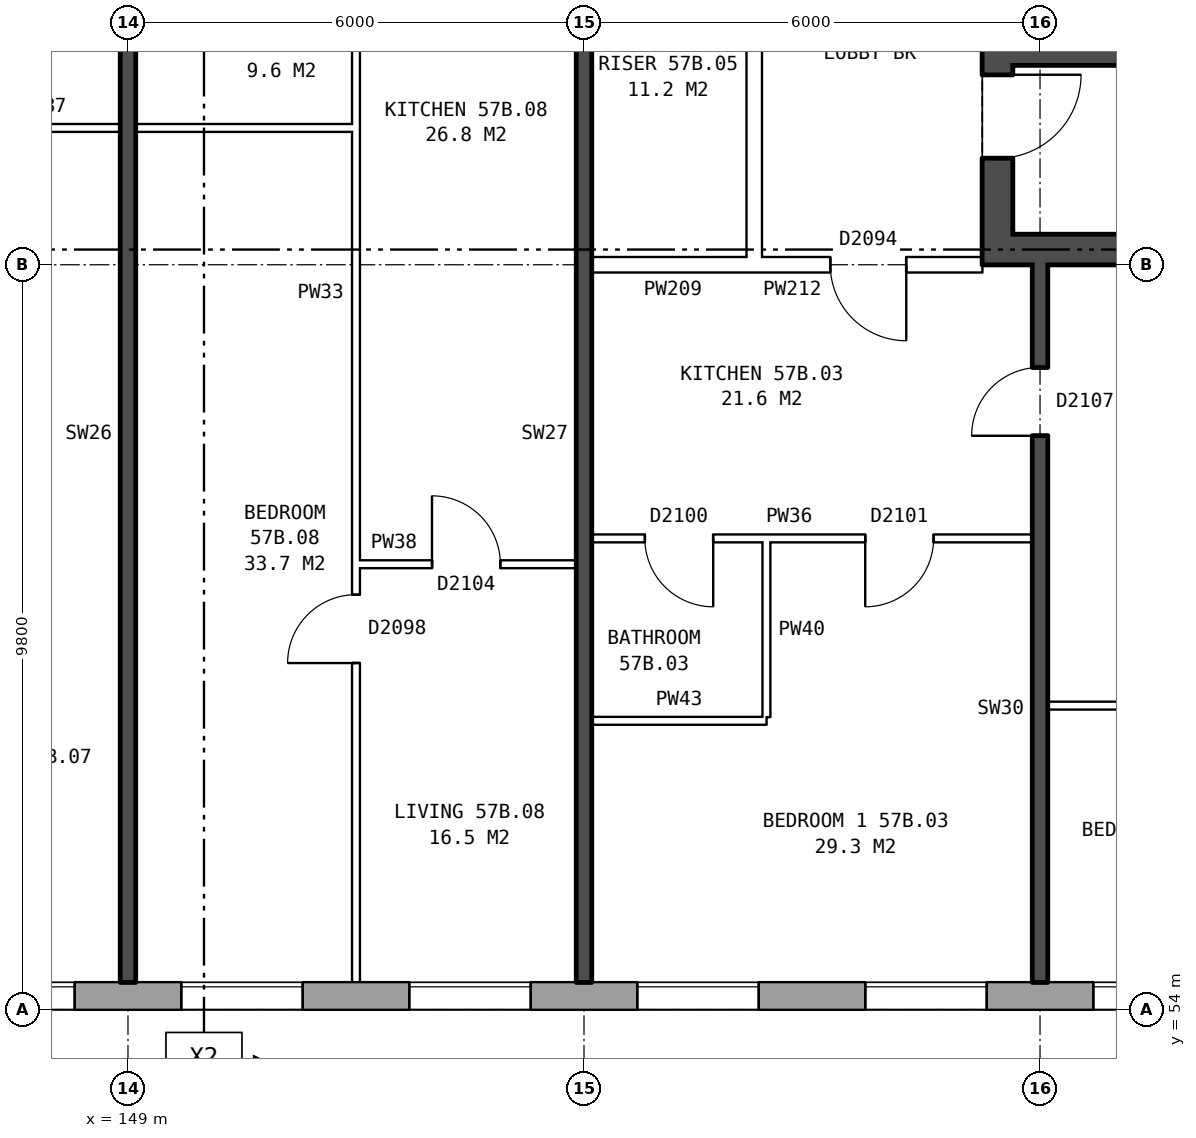
"""IFC4 building model, lengths in metres.
Left out: names, types, materials, properties, quantities, classifications, styles, units other than length and angle.
Written with IfcOpenShell. Run it as: python <this file> out.ifc"""

import sys

from ifc_helpers import new_model, si_unit, direction, frame, frame_2d, origin, place, context, subcontext, project, spatial, rectangle, extrude, element, fill, save


model = new_model("IFC4")
c1 = context("Model", 3, precision=1e-05, world=origin(), true_north=direction((0.0, 1.0)))
c2 = subcontext(c1, "Body", "Model", "MODEL_VIEW")
j1 = project(units=[si_unit("LENGTHUNIT", "METRE"), si_unit("PLANEANGLEUNIT", "RADIAN")], contexts=[c1])
p1 = place(None, origin())
s1 = spatial("IfcSite", under=j1, at=p1, CompositionType="ELEMENT")
p2 = place(p1, origin())
s2 = spatial("IfcBuilding", under=s1, at=p2, CompositionType="ELEMENT")
p3 = place(p2, frame((0.0, 0.0, 202.8)))
s3 = spatial("IfcBuildingStorey", under=s2, at=p3, CompositionType="ELEMENT", Elevation=202.8)
p4 = place(p3, frame((132.05, 54.18, 0.0), z_axis=(0.0, 0.0, 1.0), x_axis=(1.0, 0.0, 0.0)))
e1 = element("IfcWall", 1, at=p4, inside=s3, PredefinedType="STANDARD", context=c2, shape_type="SweptSolid", body=[
    extrude(rectangle(XDim=33.875, YDim=0.36, at=frame_2d((16.938, 0.0))), origin(), (0.0, 0.0, 1.0), 2.85),
])
p5 = place(p4, frame((2.65, 0.0, 0.8)))
e2 = element("IfcOpeningElement", 2, at=p5, cuts=e1, PredefinedType="OPENING", context=c2, shape_type="SweptSolid", body=[
    extrude(rectangle(XDim=1.6, YDim=1.8, at=frame_2d((0.8, 0.9))), frame((0.0, 0.19, 0.0), z_axis=(0.0, -1.0, 0.0), x_axis=(1.0, 0.0, 0.0)), (0.0, 0.0, 1.0), 0.38),
])
p6 = place(p4, frame((5.65, 0.0, 0.8)))
e3 = element("IfcOpeningElement", 3, at=p6, cuts=e1, PredefinedType="OPENING", context=c2, shape_type="SweptSolid", body=[
    extrude(rectangle(XDim=1.6, YDim=1.8, at=frame_2d((0.8, 0.9))), frame((0.0, 0.19, 0.0), z_axis=(0.0, -1.0, 0.0), x_axis=(1.0, 0.0, 0.0)), (0.0, 0.0, 1.0), 0.38),
])
p7 = place(p4, frame((8.65, 0.0, 0.8)))
e4 = element("IfcOpeningElement", 4, at=p7, cuts=e1, PredefinedType="OPENING", context=c2, shape_type="SweptSolid", body=[
    extrude(rectangle(XDim=1.6, YDim=1.8, at=frame_2d((0.8, 0.9))), frame((0.0, 0.19, 0.0), z_axis=(0.0, -1.0, 0.0), x_axis=(1.0, 0.0, 0.0)), (0.0, 0.0, 1.0), 0.38),
])
p8 = place(p4, frame((11.65, 0.0, 0.8)))
e5 = element("IfcOpeningElement", 5, at=p8, cuts=e1, PredefinedType="OPENING", context=c2, shape_type="SweptSolid", body=[
    extrude(rectangle(XDim=1.6, YDim=1.8, at=frame_2d((0.8, 0.9))), frame((0.0, 0.19, 0.0), z_axis=(0.0, -1.0, 0.0), x_axis=(1.0, 0.0, 0.0)), (0.0, 0.0, 1.0), 0.38),
])
p9 = place(p4, frame((14.65, 0.0, 0.8)))
e6 = element("IfcOpeningElement", 6, at=p9, cuts=e1, PredefinedType="OPENING", context=c2, shape_type="SweptSolid", body=[
    extrude(rectangle(XDim=1.6, YDim=1.8, at=frame_2d((0.8, 0.9))), frame((0.0, 0.19, 0.0), z_axis=(0.0, -1.0, 0.0), x_axis=(1.0, 0.0, 0.0)), (0.0, 0.0, 1.0), 0.38),
])
p10 = place(p4, frame((17.65, 0.0, 0.8)))
e7 = element("IfcOpeningElement", 7, at=p10, cuts=e1, PredefinedType="OPENING", context=c2, shape_type="SweptSolid", body=[
    extrude(rectangle(XDim=1.6, YDim=1.8, at=frame_2d((0.8, 0.9))), frame((0.0, 0.19, 0.0), z_axis=(0.0, -1.0, 0.0), x_axis=(1.0, 0.0, 0.0)), (0.0, 0.0, 1.0), 0.38),
])
p11 = place(p4, frame((20.65, 0.0, 0.8)))
e8 = element("IfcOpeningElement", 8, at=p11, cuts=e1, PredefinedType="OPENING", context=c2, shape_type="SweptSolid", body=[
    extrude(rectangle(XDim=1.6, YDim=1.8, at=frame_2d((0.8, 0.9))), frame((0.0, 0.19, 0.0), z_axis=(0.0, -1.0, 0.0), x_axis=(1.0, 0.0, 0.0)), (0.0, 0.0, 1.0), 0.38),
])
p12 = place(p4, frame((23.65, 0.0, 0.8)))
e9 = element("IfcOpeningElement", 9, at=p12, cuts=e1, PredefinedType="OPENING", context=c2, shape_type="SweptSolid", body=[
    extrude(rectangle(XDim=1.6, YDim=1.8, at=frame_2d((0.8, 0.9))), frame((0.0, 0.19, 0.0), z_axis=(0.0, -1.0, 0.0), x_axis=(1.0, 0.0, 0.0)), (0.0, 0.0, 1.0), 0.38),
])
p13 = place(p4, frame((26.65, 0.0, 0.8)))
e10 = element("IfcOpeningElement", 10, at=p13, cuts=e1, PredefinedType="OPENING", context=c2, shape_type="SweptSolid", body=[
    extrude(rectangle(XDim=1.6, YDim=1.8, at=frame_2d((0.8, 0.9))), frame((0.0, 0.19, 0.0), z_axis=(0.0, -1.0, 0.0), x_axis=(1.0, 0.0, 0.0)), (0.0, 0.0, 1.0), 0.38),
])
p14 = place(p4, frame((29.65, 0.0, 0.8)))
e11 = element("IfcOpeningElement", 11, at=p14, cuts=e1, PredefinedType="OPENING", context=c2, shape_type="SweptSolid", body=[
    extrude(rectangle(XDim=1.6, YDim=1.8, at=frame_2d((0.8, 0.9))), frame((0.0, 0.19, 0.0), z_axis=(0.0, -1.0, 0.0), x_axis=(1.0, 0.0, 0.0)), (0.0, 0.0, 1.0), 0.38),
])
p15 = place(p3, frame((160.44, 76.2, 0.0), z_axis=(0.0, 0.0, 1.0), x_axis=(0.0, -1.0, 0.0)))
e12 = element("IfcWall", 12, at=p15, inside=s3, PredefinedType="SHEAR", context=c2, shape_type="SweptSolid", body=[
    extrude(rectangle(XDim=12.4, YDim=0.4, at=frame_2d((6.2, 0.0))), origin(), (0.0, 0.0, 1.0), 2.85),
])
p16 = place(p15, frame((1.325, 0.0, 0.0)))
e13 = element("IfcOpeningElement", 13, at=p16, cuts=e12, PredefinedType="OPENING", context=c2, shape_type="SweptSolid", body=[
    extrude(rectangle(XDim=1.1, YDim=2.1, at=frame_2d((0.55, 1.05))), frame((0.0, 0.21, 0.0), z_axis=(0.0, -1.0, 0.0), x_axis=(1.0, 0.0, 0.0)), (0.0, 0.0, 1.0), 0.42),
])
p17 = place(p15, frame((4.825, 0.0, 0.0)))
e14 = element("IfcOpeningElement", 14, at=p17, cuts=e12, PredefinedType="OPENING", context=c2, shape_type="SweptSolid", body=[
    extrude(rectangle(XDim=0.85, YDim=2.1, at=frame_2d((0.425, 1.05))), frame((0.0, 0.21, 0.0), z_axis=(0.0, -1.0, 0.0), x_axis=(1.0, 0.0, 0.0)), (0.0, 0.0, 1.0), 0.42),
])
p18 = place(p15, frame((9.9, 0.0, 0.0)))
e15 = element("IfcOpeningElement", 15, at=p18, cuts=e12, PredefinedType="OPENING", context=c2, shape_type="SweptSolid", body=[
    extrude(rectangle(XDim=1.1, YDim=2.1, at=frame_2d((0.55, 1.05))), frame((0.0, 0.21, 0.0), z_axis=(0.0, -1.0, 0.0), x_axis=(1.0, 0.0, 0.0)), (0.0, 0.0, 1.0), 0.42),
])
p19 = place(p15, frame((8.125, 0.0, 0.0)))
e16 = element("IfcOpeningElement", 16, at=p19, cuts=e12, PredefinedType="OPENING", context=c2, shape_type="SweptSolid", body=[
    extrude(rectangle(XDim=0.85, YDim=2.1, at=frame_2d((0.425, 1.05))), frame((0.0, 0.21, 0.0), z_axis=(0.0, -1.0, 0.0), x_axis=(1.0, 0.0, 0.0)), (0.0, 0.0, 1.0), 0.42),
])
p20 = place(p3, frame((160.64, 64.0, 0.0), z_axis=(0.0, 0.0, 1.0), x_axis=(1.0, 0.0, 0.0)))
e17 = element("IfcWall", 17, at=p20, inside=s3, PredefinedType="SHEAR", context=c2, shape_type="SweptSolid", body=[
    extrude(rectangle(XDim=7.6, YDim=0.4, at=frame_2d((3.8, 0.0))), origin(), (0.0, 0.0, 1.0), 2.85),
])
p21 = place(p3, frame((160.64, 66.55, 0.0), z_axis=(0.0, 0.0, 1.0), x_axis=(1.0, 0.0, 0.0)))
e18 = element("IfcWall", 18, at=p21, inside=s3, PredefinedType="SHEAR", context=c2, shape_type="SweptSolid", body=[
    extrude(rectangle(XDim=2.525, YDim=0.25, at=frame_2d((1.263, 0.0))), origin(), (0.0, 0.0, 1.0), 2.85),
])
p22 = place(p3, frame((157.24, 63.9, 0.0), z_axis=(0.0, 0.0, 1.0), x_axis=(0.0, 1.0, 0.0)))
e19 = element("IfcWall", 19, at=p22, inside=s3, PredefinedType="PARTITIONING", context=c2, shape_type="SweptSolid", body=[
    extrude(rectangle(XDim=12.2, YDim=0.2, at=frame_2d((6.1, 0.0))), origin(), (0.0, 0.0, 1.0), 2.85),
])
p23 = place(p22, frame((5.1, 0.0, 0.0)))
e20 = element("IfcOpeningElement", 20, at=p23, cuts=e19, PredefinedType="OPENING", context=c2, shape_type="SweptSolid", body=[
    extrude(rectangle(XDim=2.0, YDim=2.1, at=frame_2d((1.0, 1.05))), frame((0.0, 0.11, 0.0), z_axis=(0.0, -1.0, 0.0), x_axis=(1.0, 0.0, 0.0)), (0.0, 0.0, 1.0), 0.22),
])
p24 = place(p3, frame((155.1, 57.8, 0.0), z_axis=(0.0, 0.0, 1.0), x_axis=(1.0, 0.0, 0.0)))
e21 = element("IfcWall", 21, at=p24, inside=s3, PredefinedType="PARTITIONING", context=c2, shape_type="SweptSolid", body=[
    extrude(rectangle(XDim=2.3, YDim=0.1, at=frame_2d((1.15, 0.0))), origin(), (0.0, 0.0, 1.0), 2.85),
])
p25 = place(p3, frame((161.1, 58.0, 0.0), z_axis=(0.0, 0.0, 1.0), x_axis=(1.0, 0.0, 0.0)))
e22 = element("IfcWall", 22, at=p25, inside=s3, PredefinedType="PARTITIONING", context=c2, shape_type="SweptSolid", body=[
    extrude(rectangle(XDim=7.54, YDim=0.1, at=frame_2d((3.77, 0.0))), origin(), (0.0, 0.0, 1.0), 2.85),
])
p26 = place(p25, frame((3.32, 0.0, 0.0)))
e23 = element("IfcOpeningElement", 23, at=p26, cuts=e22, PredefinedType="OPENING", context=c2, shape_type="SweptSolid", body=[
    extrude(rectangle(XDim=0.9, YDim=2.1, at=frame_2d((0.45, 1.05))), frame((0.0, 0.06, 0.0), z_axis=(0.0, -1.0, 0.0), x_axis=(1.0, 0.0, 0.0)), (0.0, 0.0, 1.0), 0.12),
])
p27 = place(p3, frame((152.0, 59.86, 0.0), z_axis=(0.0, 0.0, 1.0), x_axis=(1.0, 0.0, 0.0)))
e24 = element("IfcWall", 24, at=p27, inside=s3, PredefinedType="PARTITIONING", context=c2, shape_type="SweptSolid", body=[
    extrude(rectangle(XDim=2.9, YDim=0.1, at=frame_2d((1.45, 0.0))), origin(), (0.0, 0.0, 1.0), 2.85),
])
p28 = place(p27, frame((1.0, 0.0, 0.0)))
e25 = element("IfcOpeningElement", 25, at=p28, cuts=e24, PredefinedType="OPENING", context=c2, shape_type="SweptSolid", body=[
    extrude(rectangle(XDim=0.9, YDim=2.1, at=frame_2d((0.45, 1.05))), frame((0.0, 0.06, 0.0), z_axis=(0.0, -1.0, 0.0), x_axis=(1.0, 0.0, 0.0)), (0.0, 0.0, 1.0), 0.12),
])
p29 = place(p3, frame((155.1, 60.2, 0.0), z_axis=(0.0, 0.0, 1.0), x_axis=(1.0, 0.0, 0.0)))
e26 = element("IfcWall", 26, at=p29, inside=s3, PredefinedType="PARTITIONING", context=c2, shape_type="SweptSolid", body=[
    extrude(rectangle(XDim=5.8, YDim=0.1, at=frame_2d((2.9, 0.0))), origin(), (0.0, 0.0, 1.0), 2.85),
])
p30 = place(p29, frame((3.6, 0.0, 0.0)))
e27 = element("IfcOpeningElement", 27, at=p30, cuts=e26, PredefinedType="OPENING", context=c2, shape_type="SweptSolid", body=[
    extrude(rectangle(XDim=0.9, YDim=2.1, at=frame_2d((0.45, 1.05))), frame((0.0, 0.06, 0.0), z_axis=(0.0, -1.0, 0.0), x_axis=(1.0, 0.0, 0.0)), (0.0, 0.0, 1.0), 0.12),
])
p31 = place(p29, frame((0.7, 0.0, 0.0)))
e28 = element("IfcOpeningElement", 28, at=p31, cuts=e26, PredefinedType="OPENING", context=c2, shape_type="SweptSolid", body=[
    extrude(rectangle(XDim=0.9, YDim=2.1, at=frame_2d((0.45, 1.05))), frame((0.0, 0.06, 0.0), z_axis=(0.0, -1.0, 0.0), x_axis=(1.0, 0.0, 0.0)), (0.0, 0.0, 1.0), 0.12),
])
p32 = place(p3, frame((155.1, 63.8, 0.0), z_axis=(0.0, 0.0, 1.0), x_axis=(1.0, 0.0, 0.0)))
e29 = element("IfcWall", 29, at=p32, inside=s3, PredefinedType="PARTITIONING", context=c2, shape_type="SweptSolid", body=[
    extrude(rectangle(XDim=2.14, YDim=0.2, at=frame_2d((1.07, 0.0))), origin(), (0.0, 0.0, 1.0), 2.85),
])
p33 = place(p3, frame((157.24, 63.8, 0.0), z_axis=(0.0, 0.0, 1.0), x_axis=(1.0, 0.0, 0.0)))
e30 = element("IfcWall", 30, at=p33, inside=s3, PredefinedType="PARTITIONING", context=c2, shape_type="SweptSolid", body=[
    extrude(rectangle(XDim=3.0, YDim=0.2, at=frame_2d((1.5, 0.0))), origin(), (0.0, 0.0, 1.0), 2.85),
])
p34 = place(p33, frame((1.0, 0.0, 0.0)))
e31 = element("IfcOpeningElement", 31, at=p34, cuts=e30, PredefinedType="OPENING", context=c2, shape_type="SweptSolid", body=[
    extrude(rectangle(XDim=1.0, YDim=2.1, at=frame_2d((0.5, 1.05))), frame((0.0, 0.11, 0.0), z_axis=(0.0, -1.0, 0.0), x_axis=(1.0, 0.0, 0.0)), (0.0, 0.0, 1.0), 0.22),
])
p35 = place(p3, frame((146.0, 65.6, 0.0), z_axis=(0.0, 0.0, 1.0), x_axis=(1.0, 0.0, 0.0)))
e32 = element("IfcWall", 32, at=p35, inside=s3, PredefinedType="PARTITIONING", context=c2, shape_type="SweptSolid", body=[
    extrude(rectangle(XDim=6.0, YDim=0.1, at=frame_2d((3.0, 0.0))), origin(), (0.0, 0.0, 1.0), 2.85),
])
p36 = place(p3, frame((149.0, 54.36, 0.0), z_axis=(0.0, 0.0, 1.0), x_axis=(0.0, 1.0, 0.0)))
e33 = element("IfcWall", 33, at=p36, inside=s3, PredefinedType="SOLIDWALL", context=c2, shape_type="SweptSolid", body=[
    extrude(rectangle(XDim=14.44, YDim=0.2, at=frame_2d((7.22, 0.0))), origin(), (0.0, 0.0, 1.0), 2.85),
])
p37 = place(p3, frame((152.0, 54.36, 0.0), z_axis=(0.0, 0.0, 1.0), x_axis=(0.0, 1.0, 0.0)))
e34 = element("IfcWall", 34, at=p37, inside=s3, PredefinedType="PARTITIONING", context=c2, shape_type="SweptSolid", body=[
    extrude(rectangle(XDim=14.34, YDim=0.1, at=frame_2d((7.17, 0.0))), origin(), (0.0, 0.0, 1.0), 2.85),
])
p38 = place(p37, frame((4.2, 0.0, 0.0)))
e35 = element("IfcOpeningElement", 35, at=p38, cuts=e34, PredefinedType="OPENING", context=c2, shape_type="SweptSolid", body=[
    extrude(rectangle(XDim=0.9, YDim=2.1, at=frame_2d((0.45, 1.05))), frame((0.0, 0.06, 0.0), z_axis=(0.0, -1.0, 0.0), x_axis=(1.0, 0.0, 0.0)), (0.0, 0.0, 1.0), 0.12),
])
p39 = place(p37, frame((13.04, 0.0, 0.0)))
e36 = element("IfcOpeningElement", 36, at=p39, cuts=e34, PredefinedType="OPENING", context=c2, shape_type="SweptSolid", body=[
    extrude(rectangle(XDim=0.9, YDim=2.1, at=frame_2d((0.45, 1.05))), frame((0.0, 0.06, 0.0), z_axis=(0.0, -1.0, 0.0), x_axis=(1.0, 0.0, 0.0)), (0.0, 0.0, 1.0), 0.12),
])
p40 = place(p3, frame((155.0, 54.36, 0.0), z_axis=(0.0, 0.0, 1.0), x_axis=(0.0, 1.0, 0.0)))
e37 = element("IfcWall", 37, at=p40, inside=s3, PredefinedType="SOLIDWALL", context=c2, shape_type="SweptSolid", body=[
    extrude(rectangle(XDim=14.44, YDim=0.2, at=frame_2d((7.22, 0.0))), origin(), (0.0, 0.0, 1.0), 2.85),
])
p41 = place(p3, frame((157.4, 57.85, 0.0), z_axis=(0.0, 0.0, 1.0), x_axis=(0.0, 1.0, 0.0)))
e38 = element("IfcWall", 38, at=p41, inside=s3, PredefinedType="PARTITIONING", context=c2, shape_type="SweptSolid", body=[
    extrude(rectangle(XDim=2.3, YDim=0.1, at=frame_2d((1.15, 0.0))), origin(), (0.0, 0.0, 1.0), 2.85),
])
p42 = place(p3, frame((161.0, 54.36, 0.0), z_axis=(0.0, 0.0, 1.0), x_axis=(0.0, 1.0, 0.0)))
e39 = element("IfcWall", 39, at=p42, inside=s3, PredefinedType="SOLIDWALL", context=c2, shape_type="SweptSolid", body=[
    extrude(rectangle(XDim=9.44, YDim=0.2, at=frame_2d((4.72, 0.0))), origin(), (0.0, 0.0, 1.0), 2.85),
])
p43 = place(p42, frame((7.19, 0.0, 0.0)))
e40 = element("IfcOpeningElement", 40, at=p43, cuts=e39, PredefinedType="OPENING", context=c2, shape_type="SweptSolid", body=[
    extrude(rectangle(XDim=0.9, YDim=2.1, at=frame_2d((0.45, 1.05))), frame((0.0, 0.11, 0.0), z_axis=(0.0, -1.0, 0.0), x_axis=(1.0, 0.0, 0.0)), (0.0, 0.0, 1.0), 0.22),
])
p44 = place(p9, origin())
e41 = element("IfcWindow", 41, at=p44, inside=s3, PartitioningType="SINGLE_PANEL", PredefinedType="WINDOW", context=c2, shape_type="SweptSolid", body=[
    extrude(rectangle(XDim=1.6, YDim=1.8, at=frame_2d((0.8, 0.9))), frame((0.0, 0.15, 0.0), z_axis=(0.0, -1.0, 0.0), x_axis=(1.0, 0.0, 0.0)), (0.0, 0.0, 1.0), 0.06),
])
fill(e6, e41)
p45 = place(p10, origin())
e42 = element("IfcWindow", 42, at=p45, inside=s3, PartitioningType="SINGLE_PANEL", PredefinedType="WINDOW", context=c2, shape_type="SweptSolid", body=[
    extrude(rectangle(XDim=1.6, YDim=1.8, at=frame_2d((0.8, 0.9))), frame((0.0, 0.15, 0.0), z_axis=(0.0, -1.0, 0.0), x_axis=(1.0, 0.0, 0.0)), (0.0, 0.0, 1.0), 0.06),
])
fill(e7, e42)
p46 = place(p11, origin())
e43 = element("IfcWindow", 43, at=p46, inside=s3, PartitioningType="SINGLE_PANEL", PredefinedType="WINDOW", context=c2, shape_type="SweptSolid", body=[
    extrude(rectangle(XDim=1.6, YDim=1.8, at=frame_2d((0.8, 0.9))), frame((0.0, 0.15, 0.0), z_axis=(0.0, -1.0, 0.0), x_axis=(1.0, 0.0, 0.0)), (0.0, 0.0, 1.0), 0.06),
])
fill(e8, e43)
p47 = place(p12, origin())
e44 = element("IfcWindow", 44, at=p47, inside=s3, PartitioningType="SINGLE_PANEL", PredefinedType="WINDOW", context=c2, shape_type="SweptSolid", body=[
    extrude(rectangle(XDim=1.6, YDim=1.8, at=frame_2d((0.8, 0.9))), frame((0.0, 0.15, 0.0), z_axis=(0.0, -1.0, 0.0), x_axis=(1.0, 0.0, 0.0)), (0.0, 0.0, 1.0), 0.06),
])
fill(e9, e44)
p48 = place(p13, origin())
e45 = element("IfcWindow", 45, at=p48, inside=s3, PartitioningType="SINGLE_PANEL", PredefinedType="WINDOW", context=c2, shape_type="SweptSolid", body=[
    extrude(rectangle(XDim=1.6, YDim=1.8, at=frame_2d((0.8, 0.9))), frame((0.0, 0.15, 0.0), z_axis=(0.0, -1.0, 0.0), x_axis=(1.0, 0.0, 0.0)), (0.0, 0.0, 1.0), 0.06),
])
fill(e10, e45)
p49 = place(p14, origin())
e46 = element("IfcWindow", 46, at=p49, inside=s3, PartitioningType="SINGLE_PANEL", PredefinedType="WINDOW", context=c2, shape_type="SweptSolid", body=[
    extrude(rectangle(XDim=1.6, YDim=1.8, at=frame_2d((0.8, 0.9))), frame((0.0, 0.15, 0.0), z_axis=(0.0, -1.0, 0.0), x_axis=(1.0, 0.0, 0.0)), (0.0, 0.0, 1.0), 0.06),
])
fill(e11, e46)
p50 = place(p18, origin())
e47 = element("IfcDoor", 47, at=p50, inside=s3, OperationType="SINGLE_SWING_LEFT", PredefinedType="DOOR", context=c2, shape_type="SweptSolid", body=[
    extrude(rectangle(XDim=1.1, YDim=2.1, at=frame_2d((0.55, 1.05))), frame((0.0, 0.185, 0.0), z_axis=(0.0, -1.0, 0.0), x_axis=(1.0, 0.0, 0.0)), (0.0, 0.0, 1.0), 0.05),
])
fill(e15, e47)
p51 = place(p30, frame((0.9, 0.0, 0.0), z_axis=(0.0, 0.0, 1.0), x_axis=(-1.0, 0.0, 0.0)))
e48 = element("IfcDoor", 48, at=p51, inside=s3, OperationType="SINGLE_SWING_RIGHT", PredefinedType="DOOR", context=c2, shape_type="SweptSolid", body=[
    extrude(rectangle(XDim=0.9, YDim=2.1, at=frame_2d((0.45, 1.05))), frame((0.0, 0.025, 0.0), z_axis=(0.0, -1.0, 0.0), x_axis=(1.0, 0.0, 0.0)), (0.0, 0.0, 1.0), 0.05),
])
fill(e27, e48)
p52 = place(p34, frame((1.0, 0.0, 0.0), z_axis=(0.0, 0.0, 1.0), x_axis=(-1.0, 0.0, 0.0)))
e49 = element("IfcDoor", 49, at=p52, inside=s3, OperationType="SINGLE_SWING_LEFT", PredefinedType="DOOR", context=c2, shape_type="SweptSolid", body=[
    extrude(rectangle(XDim=1.0, YDim=2.1, at=frame_2d((0.5, 1.05))), frame((0.0, 0.025, 0.0), z_axis=(0.0, -1.0, 0.0), x_axis=(1.0, 0.0, 0.0)), (0.0, 0.0, 1.0), 0.05),
])
fill(e31, e49)
p53 = place(p43, origin())
e50 = element("IfcDoor", 50, at=p53, inside=s3, OperationType="SINGLE_SWING_LEFT", PredefinedType="DOOR", context=c2, shape_type="SweptSolid", body=[
    extrude(rectangle(XDim=0.9, YDim=2.1, at=frame_2d((0.45, 1.05))), frame((0.0, 0.025, 0.0), z_axis=(0.0, -1.0, 0.0), x_axis=(1.0, 0.0, 0.0)), (0.0, 0.0, 1.0), 0.05),
])
fill(e40, e50)
p54 = place(p31, frame((0.9, 0.0, 0.0), z_axis=(0.0, 0.0, 1.0), x_axis=(-1.0, 0.0, 0.0)))
e51 = element("IfcDoor", 51, at=p54, inside=s3, OperationType="SINGLE_SWING_LEFT", PredefinedType="DOOR", context=c2, shape_type="SweptSolid", body=[
    extrude(rectangle(XDim=0.9, YDim=2.1, at=frame_2d((0.45, 1.05))), frame((0.0, 0.025, 0.0), z_axis=(0.0, -1.0, 0.0), x_axis=(1.0, 0.0, 0.0)), (0.0, 0.0, 1.0), 0.05),
])
fill(e28, e51)
p55 = place(p38, origin())
e52 = element("IfcDoor", 52, at=p55, inside=s3, OperationType="SINGLE_SWING_LEFT", PredefinedType="DOOR", context=c2, shape_type="SweptSolid", body=[
    extrude(rectangle(XDim=0.9, YDim=2.1, at=frame_2d((0.45, 1.05))), frame((0.0, 0.025, 0.0), z_axis=(0.0, -1.0, 0.0), x_axis=(1.0, 0.0, 0.0)), (0.0, 0.0, 1.0), 0.05),
])
fill(e35, e52)
p56 = place(p28, origin())
e53 = element("IfcDoor", 53, at=p56, inside=s3, OperationType="SINGLE_SWING_LEFT", PredefinedType="DOOR", context=c2, shape_type="SweptSolid", body=[
    extrude(rectangle(XDim=0.9, YDim=2.1, at=frame_2d((0.45, 1.05))), frame((0.0, 0.025, 0.0), z_axis=(0.0, -1.0, 0.0), x_axis=(1.0, 0.0, 0.0)), (0.0, 0.0, 1.0), 0.05),
])
fill(e25, e53)
save(model, sys.argv[1])
